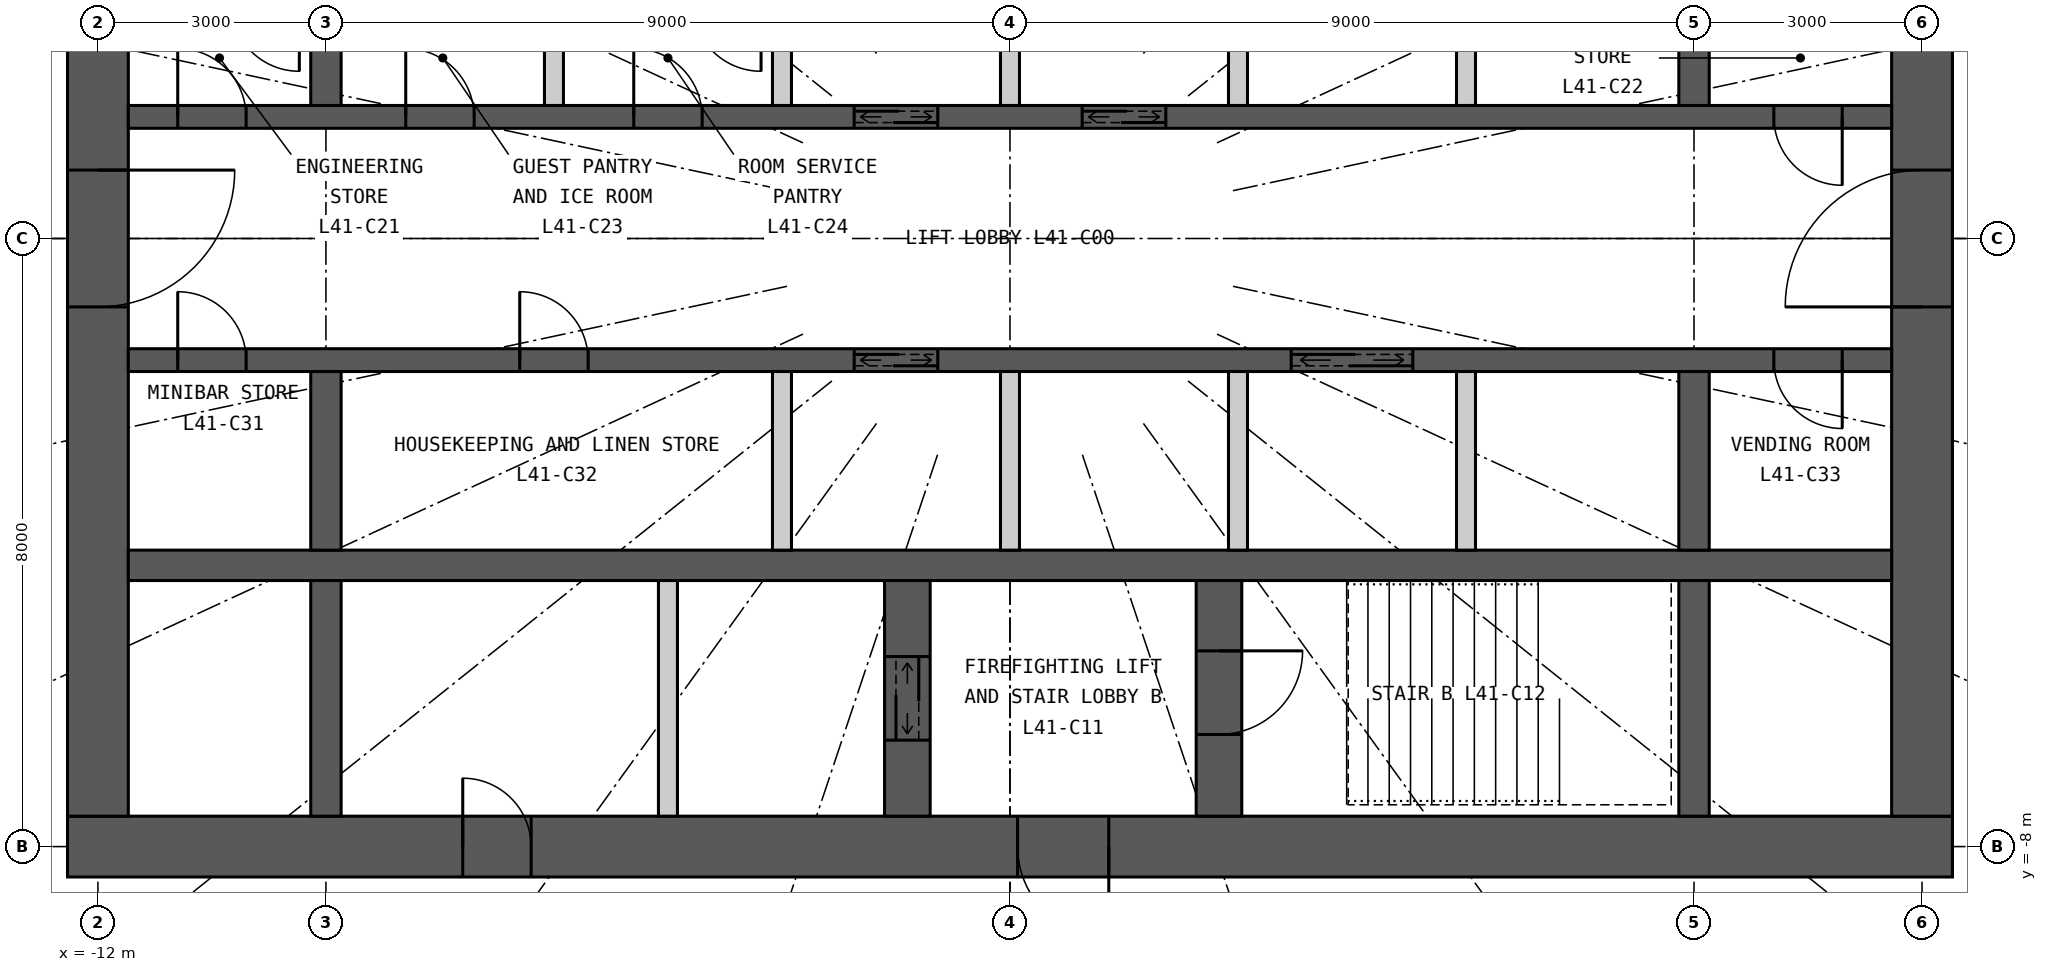
"""IFC4 building model, lengths in metres.
Left out: names, types, materials, properties, quantities, classifications, styles, units other than length and angle.
Written with IfcOpenShell. Run it as: python <this file> out.ifc"""

import sys

from ifc_helpers import new_model, si_unit, direction, frame, frame_2d, origin, place, context, subcontext, project, spatial, rectangle, extrude, element, fill, save


model = new_model("IFC4")
c1 = context("Model", 3, precision=1e-05, world=origin(), true_north=direction((0.0, 1.0)))
c2 = subcontext(c1, "Body", "Model", "MODEL_VIEW")
j1 = project(units=[si_unit("LENGTHUNIT", "METRE"), si_unit("PLANEANGLEUNIT", "RADIAN")], contexts=[c1])
p1 = place(None, origin())
s1 = spatial("IfcSite", under=j1, at=p1, CompositionType="ELEMENT")
p2 = place(p1, origin())
s2 = spatial("IfcBuilding", under=s1, at=p2, CompositionType="ELEMENT")
p3 = place(p2, frame((0.0, 0.0, 156.6)))
s3 = spatial("IfcBuildingStorey", under=s2, at=p3, CompositionType="ELEMENT", Elevation=156.6)
p4 = place(p3, frame((12.4, -8.0, 0.0), z_axis=(0.0, 0.0, 1.0), x_axis=(-1.0, 0.0, 0.0)))
e1 = element("IfcWall", 1, at=p4, inside=s3, PredefinedType="SHEAR", context=c2, shape_type="SweptSolid", body=[
    extrude(rectangle(XDim=24.8, YDim=0.8, at=frame_2d((12.4, 0.0))), origin(), (0.0, 0.0, 1.0), 3.3),
])
p5 = place(p4, frame((11.1, 0.0, 0.0)))
e2 = element("IfcOpeningElement", 2, at=p5, cuts=e1, PredefinedType="OPENING", context=c2, shape_type="SweptSolid", body=[
    extrude(rectangle(XDim=1.2, YDim=2.2, at=frame_2d((0.6, 1.1))), frame((0.0, 0.41, 0.0), z_axis=(0.0, -1.0, 0.0), x_axis=(1.0, 0.0, 0.0)), (0.0, 0.0, 1.0), 0.82),
])
p6 = place(p4, frame((18.7, 0.0, 0.0)))
e3 = element("IfcOpeningElement", 3, at=p6, cuts=e1, PredefinedType="OPENING", context=c2, shape_type="SweptSolid", body=[
    extrude(rectangle(XDim=0.9, YDim=2.2, at=frame_2d((0.45, 1.1))), frame((0.0, 0.41, 0.0), z_axis=(0.0, -1.0, 0.0), x_axis=(1.0, 0.0, 0.0)), (0.0, 0.0, 1.0), 0.82),
])
p7 = place(p3, frame((12.0, -7.6, 0.0), z_axis=(0.0, 0.0, 1.0), x_axis=(0.0, 1.0, 0.0)))
e4 = element("IfcWall", 4, at=p7, inside=s3, PredefinedType="SHEAR", context=c2, shape_type="SweptSolid", body=[
    extrude(rectangle(XDim=15.2, YDim=0.8, at=frame_2d((7.6, 0.0))), origin(), (0.0, 0.0, 1.0), 3.3),
])
p8 = place(p7, frame((6.7, 0.0, 0.0)))
e5 = element("IfcOpeningElement", 5, at=p8, cuts=e4, PredefinedType="OPENING", context=c2, shape_type="SweptSolid", body=[
    extrude(rectangle(XDim=1.8, YDim=2.2, at=frame_2d((0.9, 1.1))), frame((0.0, 0.41, 0.0), z_axis=(0.0, -1.0, 0.0), x_axis=(1.0, 0.0, 0.0)), (0.0, 0.0, 1.0), 0.82),
])
p9 = place(p3, frame((-12.0, 7.6, 0.0), z_axis=(0.0, 0.0, 1.0), x_axis=(0.0, -1.0, 0.0)))
e6 = element("IfcWall", 6, at=p9, inside=s3, PredefinedType="SHEAR", context=c2, shape_type="SweptSolid", body=[
    extrude(rectangle(XDim=15.2, YDim=0.8, at=frame_2d((7.6, 0.0))), origin(), (0.0, 0.0, 1.0), 3.3),
])
p10 = place(p9, frame((6.7, 0.0, 0.0)))
e7 = element("IfcOpeningElement", 7, at=p10, cuts=e6, PredefinedType="OPENING", context=c2, shape_type="SweptSolid", body=[
    extrude(rectangle(XDim=1.8, YDim=2.2, at=frame_2d((0.9, 1.1))), frame((0.0, 0.41, 0.0), z_axis=(0.0, -1.0, 0.0), x_axis=(1.0, 0.0, 0.0)), (0.0, 0.0, 1.0), 0.82),
])
p11 = place(p3, frame((-11.6, 1.6, 0.0), z_axis=(0.0, 0.0, 1.0), x_axis=(1.0, 0.0, 0.0)))
e8 = element("IfcWall", 8, at=p11, inside=s3, PredefinedType="SHEAR", context=c2, shape_type="SweptSolid", body=[
    extrude(rectangle(XDim=23.2, YDim=0.3, at=frame_2d((11.6, 0.0))), origin(), (0.0, 0.0, 1.0), 3.3),
])
p12 = place(p11, frame((9.55, 0.0, 0.0)))
e9 = element("IfcOpeningElement", 9, at=p12, cuts=e8, PredefinedType="OPENING", context=c2, shape_type="SweptSolid", body=[
    extrude(rectangle(XDim=1.1, YDim=2.2, at=frame_2d((0.55, 1.1))), frame((0.0, 0.16, 0.0), z_axis=(0.0, -1.0, 0.0), x_axis=(1.0, 0.0, 0.0)), (0.0, 0.0, 1.0), 0.32),
])
p13 = place(p11, frame((12.55, 0.0, 0.0)))
e10 = element("IfcOpeningElement", 10, at=p13, cuts=e8, PredefinedType="OPENING", context=c2, shape_type="SweptSolid", body=[
    extrude(rectangle(XDim=1.1, YDim=2.2, at=frame_2d((0.55, 1.1))), frame((0.0, 0.16, 0.0), z_axis=(0.0, -1.0, 0.0), x_axis=(1.0, 0.0, 0.0)), (0.0, 0.0, 1.0), 0.32),
])
p14 = place(p11, frame((0.65, 0.0, 0.0)))
e11 = element("IfcOpeningElement", 11, at=p14, cuts=e8, PredefinedType="OPENING", context=c2, shape_type="SweptSolid", body=[
    extrude(rectangle(XDim=0.9, YDim=2.2, at=frame_2d((0.45, 1.1))), frame((0.0, 0.16, 0.0), z_axis=(0.0, -1.0, 0.0), x_axis=(1.0, 0.0, 0.0)), (0.0, 0.0, 1.0), 0.32),
])
p15 = place(p11, frame((21.65, 0.0, 0.0)))
e12 = element("IfcOpeningElement", 12, at=p15, cuts=e8, PredefinedType="OPENING", context=c2, shape_type="SweptSolid", body=[
    extrude(rectangle(XDim=0.9, YDim=2.2, at=frame_2d((0.45, 1.1))), frame((0.0, 0.16, 0.0), z_axis=(0.0, -1.0, 0.0), x_axis=(1.0, 0.0, 0.0)), (0.0, 0.0, 1.0), 0.32),
])
p16 = place(p11, frame((3.65, 0.0, 0.0)))
e13 = element("IfcOpeningElement", 13, at=p16, cuts=e8, PredefinedType="OPENING", context=c2, shape_type="SweptSolid", body=[
    extrude(rectangle(XDim=0.9, YDim=2.2, at=frame_2d((0.45, 1.1))), frame((0.0, 0.16, 0.0), z_axis=(0.0, -1.0, 0.0), x_axis=(1.0, 0.0, 0.0)), (0.0, 0.0, 1.0), 0.32),
])
p17 = place(p11, frame((6.65, 0.0, 0.0)))
e14 = element("IfcOpeningElement", 14, at=p17, cuts=e8, PredefinedType="OPENING", context=c2, shape_type="SweptSolid", body=[
    extrude(rectangle(XDim=0.9, YDim=2.2, at=frame_2d((0.45, 1.1))), frame((0.0, 0.16, 0.0), z_axis=(0.0, -1.0, 0.0), x_axis=(1.0, 0.0, 0.0)), (0.0, 0.0, 1.0), 0.32),
])
p18 = place(p3, frame((-11.6, -4.3, 0.0), z_axis=(0.0, 0.0, 1.0), x_axis=(1.0, 0.0, 0.0)))
e15 = element("IfcWall", 15, at=p18, inside=s3, PredefinedType="SHEAR", context=c2, shape_type="SweptSolid", body=[
    extrude(rectangle(XDim=23.2, YDim=0.4, at=frame_2d((11.6, 0.0))), origin(), (0.0, 0.0, 1.0), 3.3),
])
p19 = place(p3, frame((-11.6, -1.6, 0.0), z_axis=(0.0, 0.0, 1.0), x_axis=(1.0, 0.0, 0.0)))
e16 = element("IfcWall", 16, at=p19, inside=s3, PredefinedType="SHEAR", context=c2, shape_type="SweptSolid", body=[
    extrude(rectangle(XDim=23.2, YDim=0.3, at=frame_2d((11.6, 0.0))), origin(), (0.0, 0.0, 1.0), 3.3),
])
p20 = place(p19, frame((9.55, 0.0, 0.0)))
e17 = element("IfcOpeningElement", 17, at=p20, cuts=e16, PredefinedType="OPENING", context=c2, shape_type="SweptSolid", body=[
    extrude(rectangle(XDim=1.1, YDim=2.2, at=frame_2d((0.55, 1.1))), frame((0.0, 0.16, 0.0), z_axis=(0.0, -1.0, 0.0), x_axis=(1.0, 0.0, 0.0)), (0.0, 0.0, 1.0), 0.32),
])
p21 = place(p19, frame((15.3, 0.0, 0.0)))
e18 = element("IfcOpeningElement", 18, at=p21, cuts=e16, PredefinedType="OPENING", context=c2, shape_type="SweptSolid", body=[
    extrude(rectangle(XDim=1.6, YDim=2.4, at=frame_2d((0.8, 1.2))), frame((0.0, 0.16, 0.0), z_axis=(0.0, -1.0, 0.0), x_axis=(1.0, 0.0, 0.0)), (0.0, 0.0, 1.0), 0.32),
])
p22 = place(p19, frame((0.65, 0.0, 0.0)))
e19 = element("IfcOpeningElement", 19, at=p22, cuts=e16, PredefinedType="OPENING", context=c2, shape_type="SweptSolid", body=[
    extrude(rectangle(XDim=0.9, YDim=2.2, at=frame_2d((0.45, 1.1))), frame((0.0, 0.16, 0.0), z_axis=(0.0, -1.0, 0.0), x_axis=(1.0, 0.0, 0.0)), (0.0, 0.0, 1.0), 0.32),
])
p23 = place(p19, frame((5.15, 0.0, 0.0)))
e20 = element("IfcOpeningElement", 20, at=p23, cuts=e16, PredefinedType="OPENING", context=c2, shape_type="SweptSolid", body=[
    extrude(rectangle(XDim=0.9, YDim=2.2, at=frame_2d((0.45, 1.1))), frame((0.0, 0.16, 0.0), z_axis=(0.0, -1.0, 0.0), x_axis=(1.0, 0.0, 0.0)), (0.0, 0.0, 1.0), 0.32),
])
p24 = place(p19, frame((21.65, 0.0, 0.0)))
e21 = element("IfcOpeningElement", 21, at=p24, cuts=e16, PredefinedType="OPENING", context=c2, shape_type="SweptSolid", body=[
    extrude(rectangle(XDim=0.9, YDim=2.2, at=frame_2d((0.45, 1.1))), frame((0.0, 0.16, 0.0), z_axis=(0.0, -1.0, 0.0), x_axis=(1.0, 0.0, 0.0)), (0.0, 0.0, 1.0), 0.32),
])
for number, where, z_axis, x_axis in (
    (22, (-9.0, 1.75, 0.0), (0.0, 0.0, 1.0), (0.0, 1.0, 0.0)),
    (23, (-9.0, -4.1, 0.0), (0.0, 0.0, 1.0), (0.0, 1.0, 0.0)),
):
    element("IfcWall", number, at=place(p3, frame(where, z_axis=z_axis, x_axis=x_axis)), inside=s3, PredefinedType="SHEAR", context=c2, shape_type="SweptSolid", body=[
        extrude(rectangle(XDim=2.35, YDim=0.4, at=frame_2d((1.175, 0.0))), origin(), (0.0, 0.0, 1.0), 3.3),
    ])
p25 = place(p3, frame((-9.0, -7.6, 0.0), z_axis=(0.0, 0.0, 1.0), x_axis=(0.0, 1.0, 0.0)))
e24 = element("IfcWall", 24, at=p25, inside=s3, PredefinedType="SHEAR", context=c2, shape_type="SweptSolid", body=[
    extrude(rectangle(XDim=3.1, YDim=0.4, at=frame_2d((1.55, 0.0))), origin(), (0.0, 0.0, 1.0), 3.3),
])
for number, where, z_axis, x_axis in (
    (25, (9.0, 1.75, 0.0), (0.0, 0.0, 1.0), (0.0, 1.0, 0.0)),
    (26, (9.0, -4.1, 0.0), (0.0, 0.0, 1.0), (0.0, 1.0, 0.0)),
):
    element("IfcWall", number, at=place(p3, frame(where, z_axis=z_axis, x_axis=x_axis)), inside=s3, PredefinedType="SHEAR", context=c2, shape_type="SweptSolid", body=[
        extrude(rectangle(XDim=2.35, YDim=0.4, at=frame_2d((1.175, 0.0))), origin(), (0.0, 0.0, 1.0), 3.3),
    ])
p26 = place(p3, frame((9.0, -7.6, 0.0), z_axis=(0.0, 0.0, 1.0), x_axis=(0.0, 1.0, 0.0)))
e27 = element("IfcWall", 27, at=p26, inside=s3, PredefinedType="SHEAR", context=c2, shape_type="SweptSolid", body=[
    extrude(rectangle(XDim=3.1, YDim=0.4, at=frame_2d((1.55, 0.0))), origin(), (0.0, 0.0, 1.0), 3.3),
])
p27 = place(p3, frame((2.75, -7.6, 0.0), z_axis=(0.0, 0.0, 1.0), x_axis=(0.0, 1.0, 0.0)))
e28 = element("IfcWall", 28, at=p27, inside=s3, PredefinedType="SHEAR", context=c2, shape_type="SweptSolid", body=[
    extrude(rectangle(XDim=3.1, YDim=0.6, at=frame_2d((1.55, 0.0))), origin(), (0.0, 0.0, 1.0), 3.3),
])
p28 = place(p27, frame((1.075, 0.0, 0.0)))
e29 = element("IfcOpeningElement", 29, at=p28, cuts=e28, PredefinedType="OPENING", context=c2, shape_type="SweptSolid", body=[
    extrude(rectangle(XDim=1.1, YDim=2.2, at=frame_2d((0.55, 1.1))), frame((0.0, 0.31, 0.0), z_axis=(0.0, -1.0, 0.0), x_axis=(1.0, 0.0, 0.0)), (0.0, 0.0, 1.0), 0.62),
])
p29 = place(p3, frame((-1.35, -7.6, 0.0), z_axis=(0.0, 0.0, 1.0), x_axis=(0.0, 1.0, 0.0)))
e30 = element("IfcWall", 30, at=p29, inside=s3, PredefinedType="SHEAR", context=c2, shape_type="SweptSolid", body=[
    extrude(rectangle(XDim=3.1, YDim=0.6, at=frame_2d((1.55, 0.0))), origin(), (0.0, 0.0, 1.0), 3.3),
])
p30 = place(p29, frame((1.0, 0.0, 0.0)))
e31 = element("IfcOpeningElement", 31, at=p30, cuts=e30, PredefinedType="OPENING", context=c2, shape_type="SweptSolid", body=[
    extrude(rectangle(XDim=1.1, YDim=2.2, at=frame_2d((0.55, 1.1))), frame((0.0, 0.31, 0.0), z_axis=(0.0, -1.0, 0.0), x_axis=(1.0, 0.0, 0.0)), (0.0, 0.0, 1.0), 0.62),
])
p31 = place(p3, frame((-4.5, -7.6, 0.0), z_axis=(0.0, 0.0, 1.0), x_axis=(0.0, 1.0, 0.0)))
e32 = element("IfcWall", 32, at=p31, inside=s3, PredefinedType="PARTITIONING", context=c2, shape_type="SweptSolid", body=[
    extrude(rectangle(XDim=3.1, YDim=0.25, at=frame_2d((1.55, 0.0))), origin(), (0.0, 0.0, 1.0), 3.3),
])
for number, where, z_axis, x_axis in (
    (33, (-6.0, 1.75, 0.0), (0.0, 0.0, 1.0), (0.0, 1.0, 0.0)),
    (34, (-3.0, 1.75, 0.0), (0.0, 0.0, 1.0), (0.0, 1.0, 0.0)),
    (35, (0.0, 1.75, 0.0), (0.0, 0.0, 1.0), (0.0, 1.0, 0.0)),
    (36, (3.0, 1.75, 0.0), (0.0, 0.0, 1.0), (0.0, 1.0, 0.0)),
    (37, (6.0, 1.75, 0.0), (0.0, 0.0, 1.0), (0.0, 1.0, 0.0)),
    (38, (-3.0, -4.1, 0.0), (0.0, 0.0, 1.0), (0.0, 1.0, 0.0)),
    (39, (0.0, -4.1, 0.0), (0.0, 0.0, 1.0), (0.0, 1.0, 0.0)),
    (40, (3.0, -4.1, 0.0), (0.0, 0.0, 1.0), (0.0, 1.0, 0.0)),
    (41, (6.0, -4.1, 0.0), (0.0, 0.0, 1.0), (0.0, 1.0, 0.0)),
):
    element("IfcWall", number, at=place(p3, frame(where, z_axis=z_axis, x_axis=x_axis)), inside=s3, PredefinedType="PARTITIONING", context=c2, shape_type="SweptSolid", body=[
        extrude(rectangle(XDim=2.35, YDim=0.25, at=frame_2d((1.175, 0.0))), origin(), (0.0, 0.0, 1.0), 3.3),
    ])
p32 = place(p5, origin())
e42 = element("IfcDoor", 42, at=p32, inside=s3, OperationType="SINGLE_SWING_LEFT", PredefinedType="DOOR", context=c2, shape_type="SweptSolid", body=[
    extrude(rectangle(XDim=1.2, YDim=2.2, at=frame_2d((0.6, 1.1))), frame((0.0, 0.025, 0.0), z_axis=(0.0, -1.0, 0.0), x_axis=(1.0, 0.0, 0.0)), (0.0, 0.0, 1.0), 0.05),
])
fill(e2, e42)
p33 = place(p28, origin())
e43 = element("IfcDoor", 43, at=p33, inside=s3, OperationType="SINGLE_SWING_RIGHT", PredefinedType="DOOR", context=c2, shape_type="SweptSolid", body=[
    extrude(rectangle(XDim=1.1, YDim=2.2, at=frame_2d((0.55, 1.1))), frame((0.0, 0.025, 0.0), z_axis=(0.0, -1.0, 0.0), x_axis=(1.0, 0.0, 0.0)), (0.0, 0.0, 1.0), 0.05),
])
fill(e29, e43)
p34 = place(p30, origin())
e44 = element("IfcDoor", 44, at=p34, inside=s3, OperationType="DOUBLE_DOOR_SLIDING", PredefinedType="DOOR", context=c2, shape_type="SweptSolid", body=[
    extrude(rectangle(XDim=1.1, YDim=2.2, at=frame_2d((0.55, 1.1))), frame((0.0, 0.025, 0.0), z_axis=(0.0, -1.0, 0.0), x_axis=(1.0, 0.0, 0.0)), (0.0, 0.0, 1.0), 0.05),
])
fill(e31, e44)
p35 = place(p6, origin())
e45 = element("IfcDoor", 45, at=p35, inside=s3, OperationType="SINGLE_SWING_RIGHT", PredefinedType="DOOR", context=c2, shape_type="SweptSolid", body=[
    extrude(rectangle(XDim=0.9, YDim=2.2, at=frame_2d((0.45, 1.1))), frame((0.0, 0.025, 0.0), z_axis=(0.0, -1.0, 0.0), x_axis=(1.0, 0.0, 0.0)), (0.0, 0.0, 1.0), 0.05),
])
fill(e3, e45)
p36 = place(p12, origin())
e46 = element("IfcDoor", 46, at=p36, inside=s3, OperationType="DOUBLE_DOOR_SLIDING", PredefinedType="DOOR", context=c2, shape_type="SweptSolid", body=[
    extrude(rectangle(XDim=1.1, YDim=2.2, at=frame_2d((0.55, 1.1))), frame((0.0, 0.025, 0.0), z_axis=(0.0, -1.0, 0.0), x_axis=(1.0, 0.0, 0.0)), (0.0, 0.0, 1.0), 0.05),
])
fill(e9, e46)
p37 = place(p13, origin())
e47 = element("IfcDoor", 47, at=p37, inside=s3, OperationType="DOUBLE_DOOR_SLIDING", PredefinedType="DOOR", context=c2, shape_type="SweptSolid", body=[
    extrude(rectangle(XDim=1.1, YDim=2.2, at=frame_2d((0.55, 1.1))), frame((0.0, 0.025, 0.0), z_axis=(0.0, -1.0, 0.0), x_axis=(1.0, 0.0, 0.0)), (0.0, 0.0, 1.0), 0.05),
])
fill(e10, e47)
p38 = place(p20, origin())
e48 = element("IfcDoor", 48, at=p38, inside=s3, OperationType="DOUBLE_DOOR_SLIDING", PredefinedType="DOOR", context=c2, shape_type="SweptSolid", body=[
    extrude(rectangle(XDim=1.1, YDim=2.2, at=frame_2d((0.55, 1.1))), frame((0.0, 0.025, 0.0), z_axis=(0.0, -1.0, 0.0), x_axis=(1.0, 0.0, 0.0)), (0.0, 0.0, 1.0), 0.05),
])
fill(e17, e48)
p39 = place(p21, origin())
e49 = element("IfcDoor", 49, at=p39, inside=s3, OperationType="DOUBLE_DOOR_SLIDING", PredefinedType="DOOR", context=c2, shape_type="SweptSolid", body=[
    extrude(rectangle(XDim=1.6, YDim=2.4, at=frame_2d((0.8, 1.2))), frame((0.0, 0.025, 0.0), z_axis=(0.0, -1.0, 0.0), x_axis=(1.0, 0.0, 0.0)), (0.0, 0.0, 1.0), 0.05),
])
fill(e18, e49)
p40 = place(p14, origin())
e50 = element("IfcDoor", 50, at=p40, inside=s3, OperationType="SINGLE_SWING_LEFT", PredefinedType="DOOR", context=c2, shape_type="SweptSolid", body=[
    extrude(rectangle(XDim=0.9, YDim=2.2, at=frame_2d((0.45, 1.1))), frame((0.0, 0.025, 0.0), z_axis=(0.0, -1.0, 0.0), x_axis=(1.0, 0.0, 0.0)), (0.0, 0.0, 1.0), 0.05),
])
fill(e11, e50)
p41 = place(p15, origin())
e51 = element("IfcDoor", 51, at=p41, inside=s3, OperationType="SINGLE_SWING_RIGHT", PredefinedType="DOOR", context=c2, shape_type="SweptSolid", body=[
    extrude(rectangle(XDim=0.9, YDim=2.2, at=frame_2d((0.45, 1.1))), frame((0.0, 0.025, 0.0), z_axis=(0.0, -1.0, 0.0), x_axis=(1.0, 0.0, 0.0)), (0.0, 0.0, 1.0), 0.05),
])
fill(e12, e51)
p42 = place(p22, origin())
e52 = element("IfcDoor", 52, at=p42, inside=s3, OperationType="SINGLE_SWING_LEFT", PredefinedType="DOOR", context=c2, shape_type="SweptSolid", body=[
    extrude(rectangle(XDim=0.9, YDim=2.2, at=frame_2d((0.45, 1.1))), frame((0.0, 0.025, 0.0), z_axis=(0.0, -1.0, 0.0), x_axis=(1.0, 0.0, 0.0)), (0.0, 0.0, 1.0), 0.05),
])
fill(e19, e52)
p43 = place(p23, origin())
e53 = element("IfcDoor", 53, at=p43, inside=s3, OperationType="SINGLE_SWING_LEFT", PredefinedType="DOOR", context=c2, shape_type="SweptSolid", body=[
    extrude(rectangle(XDim=0.9, YDim=2.2, at=frame_2d((0.45, 1.1))), frame((0.0, 0.025, 0.0), z_axis=(0.0, -1.0, 0.0), x_axis=(1.0, 0.0, 0.0)), (0.0, 0.0, 1.0), 0.05),
])
fill(e20, e53)
p44 = place(p24, origin())
e54 = element("IfcDoor", 54, at=p44, inside=s3, OperationType="SINGLE_SWING_RIGHT", PredefinedType="DOOR", context=c2, shape_type="SweptSolid", body=[
    extrude(rectangle(XDim=0.9, YDim=2.2, at=frame_2d((0.45, 1.1))), frame((0.0, 0.025, 0.0), z_axis=(0.0, -1.0, 0.0), x_axis=(1.0, 0.0, 0.0)), (0.0, 0.0, 1.0), 0.05),
])
fill(e21, e54)
p45 = place(p16, origin())
e55 = element("IfcDoor", 55, at=p45, inside=s3, OperationType="SINGLE_SWING_LEFT", PredefinedType="DOOR", context=c2, shape_type="SweptSolid", body=[
    extrude(rectangle(XDim=0.9, YDim=2.2, at=frame_2d((0.45, 1.1))), frame((0.0, 0.025, 0.0), z_axis=(0.0, -1.0, 0.0), x_axis=(1.0, 0.0, 0.0)), (0.0, 0.0, 1.0), 0.05),
])
fill(e13, e55)
p46 = place(p17, origin())
e56 = element("IfcDoor", 56, at=p46, inside=s3, OperationType="SINGLE_SWING_LEFT", PredefinedType="DOOR", context=c2, shape_type="SweptSolid", body=[
    extrude(rectangle(XDim=0.9, YDim=2.2, at=frame_2d((0.45, 1.1))), frame((0.0, 0.025, 0.0), z_axis=(0.0, -1.0, 0.0), x_axis=(1.0, 0.0, 0.0)), (0.0, 0.0, 1.0), 0.05),
])
fill(e14, e56)
p47 = place(p8, origin())
e57 = element("IfcDoor", 57, at=p47, inside=s3, OperationType="DOUBLE_DOOR_DOUBLE_SWING", PredefinedType="DOOR", context=c2, shape_type="SweptSolid", body=[
    extrude(rectangle(XDim=1.8, YDim=2.2, at=frame_2d((0.9, 1.1))), frame((0.0, 0.025, 0.0), z_axis=(0.0, -1.0, 0.0), x_axis=(1.0, 0.0, 0.0)), (0.0, 0.0, 1.0), 0.05),
])
fill(e5, e57)
p48 = place(p10, origin())
e58 = element("IfcDoor", 58, at=p48, inside=s3, OperationType="DOUBLE_DOOR_DOUBLE_SWING", PredefinedType="DOOR", context=c2, shape_type="SweptSolid", body=[
    extrude(rectangle(XDim=1.8, YDim=2.2, at=frame_2d((0.9, 1.1))), frame((0.0, 0.025, 0.0), z_axis=(0.0, -1.0, 0.0), x_axis=(1.0, 0.0, 0.0)), (0.0, 0.0, 1.0), 0.05),
])
fill(e7, e58)
save(model, sys.argv[1])
